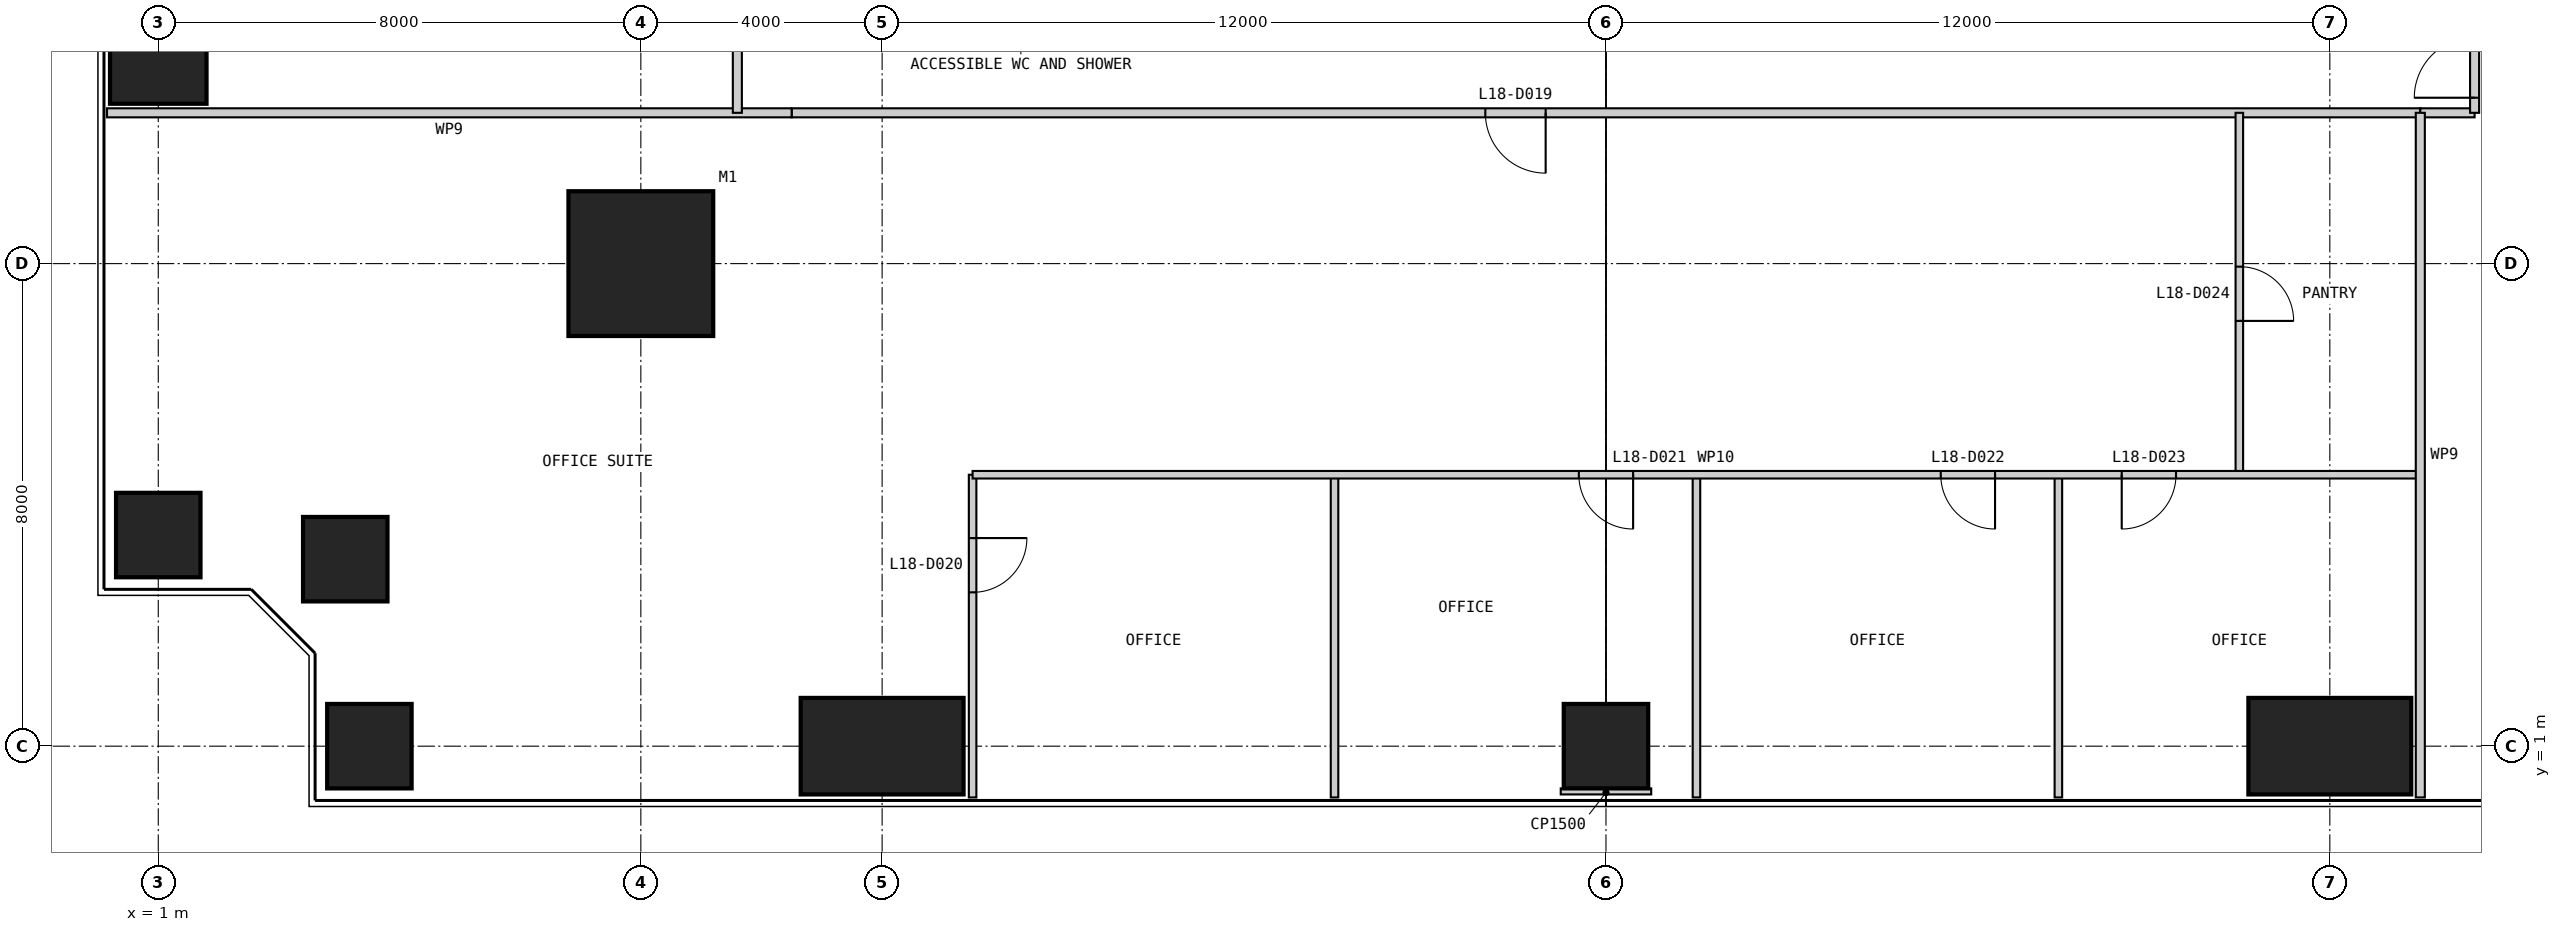
"""IFC4 building model, lengths in metres.
Left out: names, types, materials, properties, quantities, classifications, styles, units other than length and angle.
Written with IfcOpenShell. Run it as: python <this file> out.ifc"""

import sys

from ifc_helpers import new_model, si_unit, direction, frame, frame_2d, origin, origin_2d, place, context, subcontext, project, spatial, rectangle, extrude, element, fill, save


model = new_model("IFC4")
c1 = context("Model", 3, precision=1e-05, world=origin(), true_north=direction((0.0, 1.0)))
c2 = subcontext(c1, "Body", "Model", "MODEL_VIEW")
j1 = project(units=[si_unit("LENGTHUNIT", "METRE"), si_unit("PLANEANGLEUNIT", "RADIAN")], contexts=[c1])
p1 = place(None, origin())
s1 = spatial("IfcSite", under=j1, at=p1, CompositionType="ELEMENT")
p2 = place(p1, origin())
s2 = spatial("IfcBuilding", under=s1, at=p2, CompositionType="ELEMENT")
p3 = place(p2, frame((0.0, 0.0, 79.0)))
s3 = spatial("IfcBuildingStorey", under=s2, at=p3, CompositionType="ELEMENT", Elevation=79.0)
p4 = place(p3, frame((9.0, 9.0, 0.0), z_axis=(0.0, 0.0, 1.0), x_axis=(1.0, 0.0, 0.0)))
e1 = element("IfcColumn", 1, at=p4, inside=s3, PredefinedType="COLUMN", context=c2, shape_type="SweptSolid", body=[
    extrude(rectangle(XDim=2.4, YDim=2.4, at=origin_2d()), origin(), (0.0, 0.0, 1.0), 4.0),
])
p5 = place(p3, frame((4.5, 1.0, 0.0), z_axis=(0.0, 0.0, 1.0), x_axis=(1.0, 0.0, 0.0)))
e2 = element("IfcColumn", 2, at=p5, inside=s3, PredefinedType="COLUMN", context=c2, shape_type="SweptSolid", body=[
    extrude(rectangle(XDim=1.4, YDim=1.4, at=origin_2d()), origin(), (0.0, 0.0, 1.0), 4.0),
])
p6 = place(p3, frame((13.0, 1.0, 0.0), z_axis=(0.0, 0.0, 1.0), x_axis=(1.0, 0.0, 0.0)))
e3 = element("IfcColumn", 3, at=p6, inside=s3, PredefinedType="COLUMN", context=c2, shape_type="SweptSolid", body=[
    extrude(rectangle(XDim=2.7, YDim=1.6, at=origin_2d()), origin(), (0.0, 0.0, 1.0), 4.0),
])
p7 = place(p3, frame((25.0, 1.0, 0.0), z_axis=(0.0, 0.0, 1.0), x_axis=(1.0, 0.0, 0.0)))
e4 = element("IfcColumn", 4, at=p7, inside=s3, PredefinedType="COLUMN", context=c2, shape_type="SweptSolid", body=[
    extrude(rectangle(XDim=1.4, YDim=1.4, at=origin_2d()), origin(), (0.0, 0.0, 1.0), 4.0),
])
p8 = place(p3, frame((37.0, 1.0, 0.0), z_axis=(0.0, 0.0, 1.0), x_axis=(1.0, 0.0, 0.0)))
e5 = element("IfcColumn", 5, at=p8, inside=s3, PredefinedType="COLUMN", context=c2, shape_type="SweptSolid", body=[
    extrude(rectangle(XDim=2.7, YDim=1.6, at=origin_2d()), origin(), (0.0, 0.0, 1.0), 4.0),
])
p9 = place(p3, frame((1.0, 13.0, 0.0), z_axis=(0.0, 0.0, 1.0), x_axis=(1.0, 0.0, 0.0)))
e6 = element("IfcColumn", 6, at=p9, inside=s3, PredefinedType="COLUMN", context=c2, shape_type="SweptSolid", body=[
    extrude(rectangle(XDim=1.6, YDim=2.7, at=origin_2d()), origin(), (0.0, 0.0, 1.0), 4.0),
])
for number, where, z_axis, x_axis in (
    (7, (1.0, 4.5, 0.0), (0.0, 0.0, 1.0), (1.0, 0.0, 0.0)),
    (8, (4.1, 4.1, 0.0), (0.0, 0.0, 1.0), (1.0, 0.0, 0.0)),
):
    element("IfcColumn", number, at=place(p3, frame(where, z_axis=z_axis, x_axis=x_axis)), inside=s3, PredefinedType="COLUMN", context=c2, shape_type="SweptSolid", body=[
        extrude(rectangle(XDim=1.4, YDim=1.4, at=origin_2d()), origin(), (0.0, 0.0, 1.0), 4.0),
    ])
p10 = place(p3, frame((11.5, 11.5, 0.0), z_axis=(0.0, 0.0, 1.0), x_axis=(1.0, 0.0, 0.0)))
e9 = element("IfcWall", 9, at=p10, inside=s3, PredefinedType="PARTITIONING", context=c2, shape_type="SweptSolid", body=[
    extrude(rectangle(XDim=27.0, YDim=0.15, at=frame_2d((13.5, 0.0))), origin(), (0.0, 0.0, 1.0), 3.85),
])
p11 = place(p10, frame((11.5, 0.0, 0.0)))
e10 = element("IfcOpeningElement", 10, at=p11, cuts=e9, PredefinedType="OPENING", context=c2, shape_type="SweptSolid", body=[
    extrude(rectangle(XDim=1.0, YDim=2.2, at=frame_2d((0.5, 1.1))), frame((0.0, 0.085, 0.0), z_axis=(0.0, -1.0, 0.0), x_axis=(1.0, 0.0, 0.0)), (0.0, 0.0, 1.0), 0.17),
])
p12 = place(p3, frame((0.15, 11.5, 0.0), z_axis=(0.0, 0.0, 1.0), x_axis=(1.0, 0.0, 0.0)))
e11 = element("IfcWall", 11, at=p12, inside=s3, PredefinedType="PARTITIONING", context=c2, shape_type="SweptSolid", body=[
    extrude(rectangle(XDim=11.35, YDim=0.15, at=frame_2d((5.675, 0.0))), origin(), (0.0, 0.0, 1.0), 3.85),
])
p13 = place(p3, frame((14.5, 0.15, 0.0), z_axis=(0.0, 0.0, 1.0), x_axis=(0.0, 1.0, 0.0)))
e12 = element("IfcWall", 12, at=p13, inside=s3, PredefinedType="PARTITIONING", context=c2, shape_type="SweptSolid", body=[
    extrude(rectangle(XDim=5.35, YDim=0.125, at=frame_2d((2.675, 0.0))), origin(), (0.0, 0.0, 1.0), 3.85),
])
p14 = place(p13, frame((3.4, 0.0, 0.0)))
e13 = element("IfcOpeningElement", 13, at=p14, cuts=e12, PredefinedType="OPENING", context=c2, shape_type="SweptSolid", body=[
    extrude(rectangle(XDim=0.9, YDim=2.2, at=frame_2d((0.45, 1.1))), frame((0.0, 0.073, 0.0), z_axis=(0.0, -1.0, 0.0), x_axis=(1.0, 0.0, 0.0)), (0.0, 0.0, 1.0), 0.145),
])
for number, where, z_axis, x_axis in (
    (14, (20.5, 0.15, 0.0), (0.0, 0.0, 1.0), (0.0, 1.0, 0.0)),
    (15, (26.5, 0.15, 0.0), (0.0, 0.0, 1.0), (0.0, 1.0, 0.0)),
    (16, (32.5, 0.15, 0.0), (0.0, 0.0, 1.0), (0.0, 1.0, 0.0)),
):
    element("IfcWall", number, at=place(p3, frame(where, z_axis=z_axis, x_axis=x_axis)), inside=s3, PredefinedType="PARTITIONING", context=c2, shape_type="SweptSolid", body=[
        extrude(rectangle(XDim=5.35, YDim=0.125, at=frame_2d((2.675, 0.0))), origin(), (0.0, 0.0, 1.0), 3.85),
    ])
p15 = place(p3, frame((35.5, 5.5, 0.0), z_axis=(0.0, 0.0, 1.0), x_axis=(0.0, 1.0, 0.0)))
e17 = element("IfcWall", 17, at=p15, inside=s3, PredefinedType="PARTITIONING", context=c2, shape_type="SweptSolid", body=[
    extrude(rectangle(XDim=6.0, YDim=0.125, at=frame_2d((3.0, 0.0))), origin(), (0.0, 0.0, 1.0), 3.85),
])
p16 = place(p15, frame((2.55, 0.0, 0.0)))
e18 = element("IfcOpeningElement", 18, at=p16, cuts=e17, PredefinedType="OPENING", context=c2, shape_type="SweptSolid", body=[
    extrude(rectangle(XDim=0.9, YDim=2.2, at=frame_2d((0.45, 1.1))), frame((0.0, 0.073, 0.0), z_axis=(0.0, -1.0, 0.0), x_axis=(1.0, 0.0, 0.0)), (0.0, 0.0, 1.0), 0.145),
])
p17 = place(p3, frame((14.5, 5.5, 0.0), z_axis=(0.0, 0.0, 1.0), x_axis=(1.0, 0.0, 0.0)))
e19 = element("IfcWall", 19, at=p17, inside=s3, PredefinedType="PARTITIONING", context=c2, shape_type="SweptSolid", body=[
    extrude(rectangle(XDim=24.0, YDim=0.125, at=frame_2d((12.0, 0.0))), origin(), (0.0, 0.0, 1.0), 3.85),
])
p18 = place(p17, frame((10.05, 0.0, 0.0)))
e20 = element("IfcOpeningElement", 20, at=p18, cuts=e19, PredefinedType="OPENING", context=c2, shape_type="SweptSolid", body=[
    extrude(rectangle(XDim=0.9, YDim=2.2, at=frame_2d((0.45, 1.1))), frame((0.0, 0.073, 0.0), z_axis=(0.0, -1.0, 0.0), x_axis=(1.0, 0.0, 0.0)), (0.0, 0.0, 1.0), 0.145),
])
p19 = place(p17, frame((16.05, 0.0, 0.0)))
e21 = element("IfcOpeningElement", 21, at=p19, cuts=e19, PredefinedType="OPENING", context=c2, shape_type="SweptSolid", body=[
    extrude(rectangle(XDim=0.9, YDim=2.2, at=frame_2d((0.45, 1.1))), frame((0.0, 0.073, 0.0), z_axis=(0.0, -1.0, 0.0), x_axis=(1.0, 0.0, 0.0)), (0.0, 0.0, 1.0), 0.145),
])
p20 = place(p17, frame((19.05, 0.0, 0.0)))
e22 = element("IfcOpeningElement", 22, at=p20, cuts=e19, PredefinedType="OPENING", context=c2, shape_type="SweptSolid", body=[
    extrude(rectangle(XDim=0.9, YDim=2.2, at=frame_2d((0.45, 1.1))), frame((0.0, 0.073, 0.0), z_axis=(0.0, -1.0, 0.0), x_axis=(1.0, 0.0, 0.0)), (0.0, 0.0, 1.0), 0.145),
])
p21 = place(p3, frame((38.5, 11.5, 0.0), z_axis=(0.0, 0.0, 1.0), x_axis=(1.0, 0.0, 0.0)))
e23 = element("IfcWall", 23, at=p21, inside=s3, PredefinedType="PARTITIONING", context=c2, shape_type="SweptSolid", body=[
    extrude(rectangle(XDim=0.9, YDim=0.15, at=frame_2d((0.45, 0.0))), origin(), (0.0, 0.0, 1.0), 3.85),
])
p22 = place(p3, frame((39.4, 11.5, 0.0), z_axis=(0.0, 0.0, 1.0), x_axis=(0.0, 1.0, 0.0)))
e24 = element("IfcWall", 24, at=p22, inside=s3, PredefinedType="PARTITIONING", context=c2, shape_type="SweptSolid", body=[
    extrude(rectangle(XDim=27.9, YDim=0.15, at=frame_2d((13.95, 0.0))), origin(), (0.0, 0.0, 1.0), 3.85),
])
p23 = place(p22, frame((0.25, 0.0, 0.0)))
e25 = element("IfcOpeningElement", 25, at=p23, cuts=e24, PredefinedType="OPENING", context=c2, shape_type="SweptSolid", body=[
    extrude(rectangle(XDim=1.0, YDim=2.2, at=frame_2d((0.5, 1.1))), frame((0.0, 0.085, 0.0), z_axis=(0.0, -1.0, 0.0), x_axis=(1.0, 0.0, 0.0)), (0.0, 0.0, 1.0), 0.17),
])
p24 = place(p22, frame((22.75, 0.0, 0.0)))
e26 = element("IfcOpeningElement", 26, at=p24, cuts=e24, PredefinedType="OPENING", context=c2, shape_type="SweptSolid", body=[
    extrude(rectangle(XDim=1.0, YDim=2.2, at=frame_2d((0.5, 1.1))), frame((0.0, 0.085, 0.0), z_axis=(0.0, -1.0, 0.0), x_axis=(1.0, 0.0, 0.0)), (0.0, 0.0, 1.0), 0.17),
])
p25 = place(p3, frame((38.5, 0.15, 0.0), z_axis=(0.0, 0.0, 1.0), x_axis=(0.0, 1.0, 0.0)))
e27 = element("IfcWall", 27, at=p25, inside=s3, PredefinedType="PARTITIONING", context=c2, shape_type="SweptSolid", body=[
    extrude(rectangle(XDim=11.35, YDim=0.15, at=frame_2d((5.675, 0.0))), origin(), (0.0, 0.0, 1.0), 3.85),
])
p26 = place(p3, frame((10.6, 39.4, 0.0), z_axis=(0.0, 0.0, 1.0), x_axis=(0.0, -1.0, 0.0)))
e28 = element("IfcWall", 28, at=p26, inside=s3, PredefinedType="PARTITIONING", context=c2, shape_type="SweptSolid", body=[
    extrude(rectangle(XDim=27.9, YDim=0.15, at=frame_2d((13.95, 0.0))), origin(), (0.0, 0.0, 1.0), 3.85),
])
p27 = place(p26, frame((3.4, 0.0, 0.0)))
e29 = element("IfcOpeningElement", 29, at=p27, cuts=e28, PredefinedType="OPENING", context=c2, shape_type="SweptSolid", body=[
    extrude(rectangle(XDim=1.0, YDim=2.2, at=frame_2d((0.5, 1.1))), frame((0.0, 0.085, 0.0), z_axis=(0.0, -1.0, 0.0), x_axis=(1.0, 0.0, 0.0)), (0.0, 0.0, 1.0), 0.17),
])
p28 = place(p26, frame((10.15, 0.0, 0.0)))
e30 = element("IfcOpeningElement", 30, at=p28, cuts=e28, PredefinedType="OPENING", context=c2, shape_type="SweptSolid", body=[
    extrude(rectangle(XDim=1.0, YDim=2.2, at=frame_2d((0.5, 1.1))), frame((0.0, 0.085, 0.0), z_axis=(0.0, -1.0, 0.0), x_axis=(1.0, 0.0, 0.0)), (0.0, 0.0, 1.0), 0.17),
])
p29 = place(p26, frame((17.65, 0.0, 0.0)))
e31 = element("IfcOpeningElement", 31, at=p29, cuts=e28, PredefinedType="OPENING", context=c2, shape_type="SweptSolid", body=[
    extrude(rectangle(XDim=1.0, YDim=2.2, at=frame_2d((0.5, 1.1))), frame((0.0, 0.085, 0.0), z_axis=(0.0, -1.0, 0.0), x_axis=(1.0, 0.0, 0.0)), (0.0, 0.0, 1.0), 0.17),
])
p30 = place(p26, frame((24.4, 0.0, 0.0)))
e32 = element("IfcOpeningElement", 32, at=p30, cuts=e28, PredefinedType="OPENING", context=c2, shape_type="SweptSolid", body=[
    extrude(rectangle(XDim=1.0, YDim=2.2, at=frame_2d((0.5, 1.1))), frame((0.0, 0.085, 0.0), z_axis=(0.0, -1.0, 0.0), x_axis=(1.0, 0.0, 0.0)), (0.0, 0.0, 1.0), 0.17),
])
p31 = place(p3, frame((25.0, 0.2, 0.0), z_axis=(0.0, 0.0, 1.0), x_axis=(0.0, 1.0, 0.0)))
e33 = element("IfcWall", 33, at=p31, inside=s3, PredefinedType="PARTITIONING", context=c2, shape_type="SweptSolid", body=[
    extrude(rectangle(XDim=0.1, YDim=1.5, at=frame_2d((0.05, 0.0))), origin(), (0.0, 0.0, 1.0), 3.85),
])
p32 = place(p11, frame((1.0, 0.0, 0.0), z_axis=(0.0, 0.0, 1.0), x_axis=(-1.0, 0.0, 0.0)))
e34 = element("IfcDoor", 34, at=p32, inside=s3, OperationType="SINGLE_SWING_LEFT", PredefinedType="DOOR", context=c2, shape_type="SweptSolid", body=[
    extrude(rectangle(XDim=1.0, YDim=2.2, at=frame_2d((0.5, 1.1))), frame((0.0, 0.025, 0.0), z_axis=(0.0, -1.0, 0.0), x_axis=(1.0, 0.0, 0.0)), (0.0, 0.0, 1.0), 0.05),
])
fill(e10, e34)
p33 = place(p14, frame((0.9, 0.0, 0.0), z_axis=(0.0, 0.0, 1.0), x_axis=(-1.0, 0.0, 0.0)))
e35 = element("IfcDoor", 35, at=p33, inside=s3, OperationType="SINGLE_SWING_LEFT", PredefinedType="DOOR", context=c2, shape_type="SweptSolid", body=[
    extrude(rectangle(XDim=0.9, YDim=2.2, at=frame_2d((0.45, 1.1))), frame((0.0, 0.025, 0.0), z_axis=(0.0, -1.0, 0.0), x_axis=(1.0, 0.0, 0.0)), (0.0, 0.0, 1.0), 0.05),
])
fill(e13, e35)
p34 = place(p18, frame((0.9, 0.0, 0.0), z_axis=(0.0, 0.0, 1.0), x_axis=(-1.0, 0.0, 0.0)))
e36 = element("IfcDoor", 36, at=p34, inside=s3, OperationType="SINGLE_SWING_LEFT", PredefinedType="DOOR", context=c2, shape_type="SweptSolid", body=[
    extrude(rectangle(XDim=0.9, YDim=2.2, at=frame_2d((0.45, 1.1))), frame((0.0, 0.025, 0.0), z_axis=(0.0, -1.0, 0.0), x_axis=(1.0, 0.0, 0.0)), (0.0, 0.0, 1.0), 0.05),
])
fill(e20, e36)
p35 = place(p19, frame((0.9, 0.0, 0.0), z_axis=(0.0, 0.0, 1.0), x_axis=(-1.0, 0.0, 0.0)))
e37 = element("IfcDoor", 37, at=p35, inside=s3, OperationType="SINGLE_SWING_LEFT", PredefinedType="DOOR", context=c2, shape_type="SweptSolid", body=[
    extrude(rectangle(XDim=0.9, YDim=2.2, at=frame_2d((0.45, 1.1))), frame((0.0, 0.025, 0.0), z_axis=(0.0, -1.0, 0.0), x_axis=(1.0, 0.0, 0.0)), (0.0, 0.0, 1.0), 0.05),
])
fill(e21, e37)
p36 = place(p20, frame((0.9, 0.0, 0.0), z_axis=(0.0, 0.0, 1.0), x_axis=(-1.0, 0.0, 0.0)))
e38 = element("IfcDoor", 38, at=p36, inside=s3, OperationType="SINGLE_SWING_RIGHT", PredefinedType="DOOR", context=c2, shape_type="SweptSolid", body=[
    extrude(rectangle(XDim=0.9, YDim=2.2, at=frame_2d((0.45, 1.1))), frame((0.0, 0.025, 0.0), z_axis=(0.0, -1.0, 0.0), x_axis=(1.0, 0.0, 0.0)), (0.0, 0.0, 1.0), 0.05),
])
fill(e22, e38)
p37 = place(p16, frame((0.9, 0.0, 0.0), z_axis=(0.0, 0.0, 1.0), x_axis=(-1.0, 0.0, 0.0)))
e39 = element("IfcDoor", 39, at=p37, inside=s3, OperationType="SINGLE_SWING_RIGHT", PredefinedType="DOOR", context=c2, shape_type="SweptSolid", body=[
    extrude(rectangle(XDim=0.9, YDim=2.2, at=frame_2d((0.45, 1.1))), frame((0.0, 0.025, 0.0), z_axis=(0.0, -1.0, 0.0), x_axis=(1.0, 0.0, 0.0)), (0.0, 0.0, 1.0), 0.05),
])
fill(e18, e39)
p38 = place(p23, origin())
e40 = element("IfcDoor", 40, at=p38, inside=s3, OperationType="SINGLE_SWING_LEFT", PredefinedType="DOOR", context=c2, shape_type="SweptSolid", body=[
    extrude(rectangle(XDim=1.0, YDim=2.2, at=frame_2d((0.5, 1.1))), frame((0.0, 0.025, 0.0), z_axis=(0.0, -1.0, 0.0), x_axis=(1.0, 0.0, 0.0)), (0.0, 0.0, 1.0), 0.05),
])
fill(e25, e40)
save(model, sys.argv[1])
